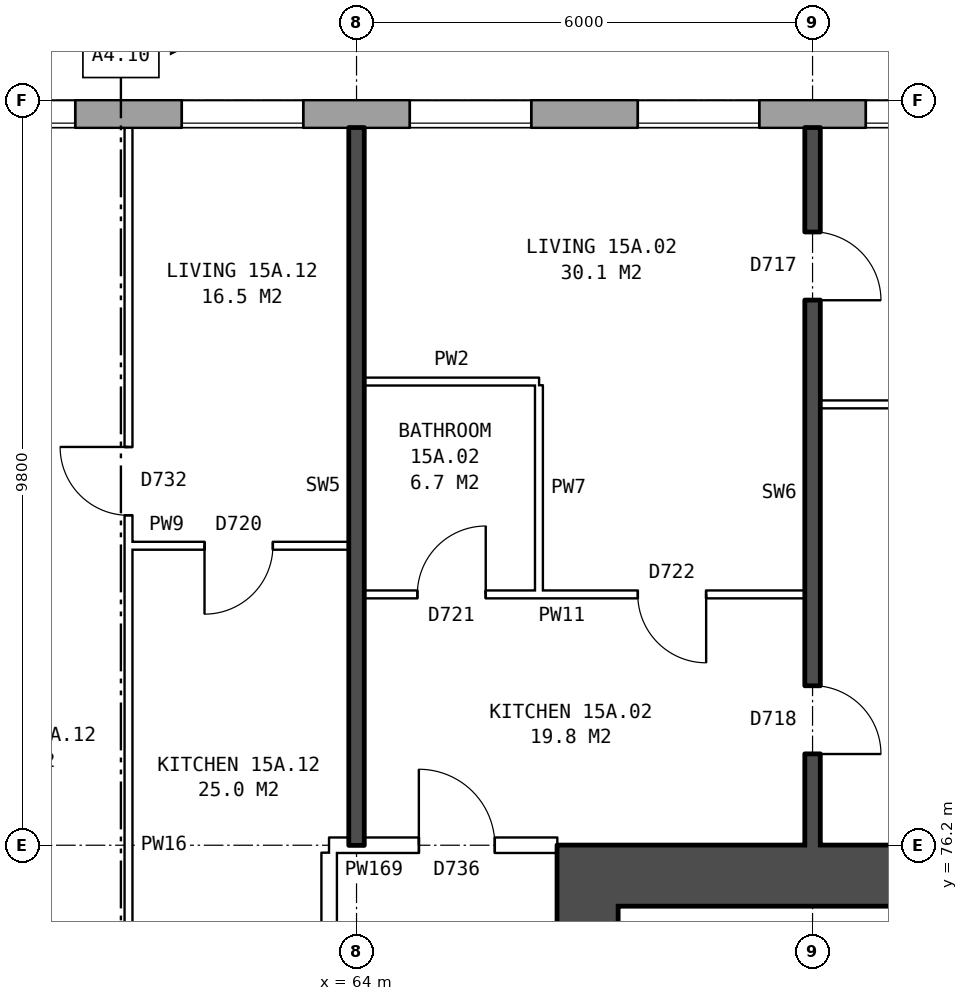
"""IFC4 building model, lengths in metres.
Left out: names, types, materials, properties, quantities, classifications, styles, units other than length and angle.
Written with IfcOpenShell. Run it as: python <this file> out.ifc"""

import sys

from ifc_helpers import new_model, si_unit, direction, frame, frame_2d, origin, place, context, subcontext, project, spatial, rectangle, extrude, element, fill, save


model = new_model("IFC4")
c1 = context("Model", 3, precision=1e-05, world=origin(), true_north=direction((0.0, 1.0)))
c2 = subcontext(c1, "Body", "Model", "MODEL_VIEW")
j1 = project(units=[si_unit("LENGTHUNIT", "METRE"), si_unit("PLANEANGLEUNIT", "RADIAN")], contexts=[c1])
p1 = place(None, origin())
s1 = spatial("IfcSite", under=j1, at=p1, CompositionType="ELEMENT")
p2 = place(p1, origin())
s2 = spatial("IfcBuilding", under=s1, at=p2, CompositionType="ELEMENT")
p3 = place(p2, frame((0.0, 0.0, 56.7)))
s3 = spatial("IfcBuildingStorey", under=s2, at=p3, CompositionType="ELEMENT", Elevation=56.7)
p4 = place(p3, frame((72.925, 85.82, 0.0), z_axis=(0.0, 0.0, 1.0), x_axis=(-1.0, 0.0, 0.0)))
e1 = element("IfcWall", 1, at=p4, inside=s3, PredefinedType="STANDARD", context=c2, shape_type="SweptSolid", body=[
    extrude(rectangle(XDim=48.351, YDim=0.36, at=frame_2d((24.175, 0.0))), origin(), (0.0, 0.0, 1.0), 2.85),
])
p5 = place(p4, frame((0.625, 0.0, 0.8)))
e2 = element("IfcOpeningElement", 2, at=p5, cuts=e1, PredefinedType="OPENING", context=c2, shape_type="SweptSolid", body=[
    extrude(rectangle(XDim=1.6, YDim=1.8, at=frame_2d((0.8, 0.9))), frame((0.0, 0.19, 0.0), z_axis=(0.0, -1.0, 0.0), x_axis=(1.0, 0.0, 0.0)), (0.0, 0.0, 1.0), 0.38),
])
p6 = place(p4, frame((3.625, 0.0, 0.8)))
e3 = element("IfcOpeningElement", 3, at=p6, cuts=e1, PredefinedType="OPENING", context=c2, shape_type="SweptSolid", body=[
    extrude(rectangle(XDim=1.6, YDim=1.8, at=frame_2d((0.8, 0.9))), frame((0.0, 0.19, 0.0), z_axis=(0.0, -1.0, 0.0), x_axis=(1.0, 0.0, 0.0)), (0.0, 0.0, 1.0), 0.38),
])
p7 = place(p4, frame((6.625, 0.0, 0.8)))
e4 = element("IfcOpeningElement", 4, at=p7, cuts=e1, PredefinedType="OPENING", context=c2, shape_type="SweptSolid", body=[
    extrude(rectangle(XDim=1.6, YDim=1.8, at=frame_2d((0.8, 0.9))), frame((0.0, 0.19, 0.0), z_axis=(0.0, -1.0, 0.0), x_axis=(1.0, 0.0, 0.0)), (0.0, 0.0, 1.0), 0.38),
])
p8 = place(p4, frame((9.625, 0.0, 0.8)))
e5 = element("IfcOpeningElement", 5, at=p8, cuts=e1, PredefinedType="OPENING", context=c2, shape_type="SweptSolid", body=[
    extrude(rectangle(XDim=1.6, YDim=1.8, at=frame_2d((0.8, 0.9))), frame((0.0, 0.19, 0.0), z_axis=(0.0, -1.0, 0.0), x_axis=(1.0, 0.0, 0.0)), (0.0, 0.0, 1.0), 0.38),
])
p9 = place(p4, frame((12.625, 0.0, 0.8)))
e6 = element("IfcOpeningElement", 6, at=p9, cuts=e1, PredefinedType="OPENING", context=c2, shape_type="SweptSolid", body=[
    extrude(rectangle(XDim=1.6, YDim=1.8, at=frame_2d((0.8, 0.9))), frame((0.0, 0.19, 0.0), z_axis=(0.0, -1.0, 0.0), x_axis=(1.0, 0.0, 0.0)), (0.0, 0.0, 1.0), 0.38),
])
p10 = place(p4, frame((15.125, 0.0, 0.8)))
e7 = element("IfcOpeningElement", 7, at=p10, cuts=e1, PredefinedType="OPENING", context=c2, shape_type="SweptSolid", body=[
    extrude(rectangle(XDim=1.0, YDim=1.8, at=frame_2d((0.5, 0.9))), frame((0.0, 0.19, 0.0), z_axis=(0.0, -1.0, 0.0), x_axis=(1.0, 0.0, 0.0)), (0.0, 0.0, 1.0), 0.38),
])
p11 = place(p4, frame((18.625, 0.0, 0.65)))
e8 = element("IfcOpeningElement", 8, at=p11, cuts=e1, PredefinedType="OPENING", context=c2, shape_type="SweptSolid", body=[
    extrude(rectangle(XDim=0.8, YDim=0.9, at=frame_2d((0.4, 0.45))), frame((0.0, 0.19, 0.0), z_axis=(0.0, -1.0, 0.0), x_axis=(1.0, 0.0, 0.0)), (0.0, 0.0, 1.0), 0.38),
])
p12 = place(p4, frame((21.625, 0.0, 0.8)))
e9 = element("IfcOpeningElement", 9, at=p12, cuts=e1, PredefinedType="OPENING", context=c2, shape_type="SweptSolid", body=[
    extrude(rectangle(XDim=1.6, YDim=1.8, at=frame_2d((0.8, 0.9))), frame((0.0, 0.19, 0.0), z_axis=(0.0, -1.0, 0.0), x_axis=(1.0, 0.0, 0.0)), (0.0, 0.0, 1.0), 0.38),
])
p13 = place(p4, frame((24.625, 0.0, 0.8)))
e10 = element("IfcOpeningElement", 10, at=p13, cuts=e1, PredefinedType="OPENING", context=c2, shape_type="SweptSolid", body=[
    extrude(rectangle(XDim=1.6, YDim=1.8, at=frame_2d((0.8, 0.9))), frame((0.0, 0.19, 0.0), z_axis=(0.0, -1.0, 0.0), x_axis=(1.0, 0.0, 0.0)), (0.0, 0.0, 1.0), 0.38),
])
p14 = place(p4, frame((27.125, 0.0, 0.8)))
e11 = element("IfcOpeningElement", 11, at=p14, cuts=e1, PredefinedType="OPENING", context=c2, shape_type="SweptSolid", body=[
    extrude(rectangle(XDim=1.0, YDim=1.8, at=frame_2d((0.5, 0.9))), frame((0.0, 0.19, 0.0), z_axis=(0.0, -1.0, 0.0), x_axis=(1.0, 0.0, 0.0)), (0.0, 0.0, 1.0), 0.38),
])
p15 = place(p4, frame((28.425, 0.0, 0.8)))
e12 = element("IfcOpeningElement", 12, at=p15, cuts=e1, PredefinedType="OPENING", context=c2, shape_type="SweptSolid", body=[
    extrude(rectangle(XDim=1.0, YDim=0.9, at=frame_2d((0.5, 0.45))), frame((0.0, 0.19, 0.0), z_axis=(0.0, -1.0, 0.0), x_axis=(1.0, 0.0, 0.0)), (0.0, 0.0, 1.0), 0.38),
])
p16 = place(p4, frame((33.625, 0.0, 0.8)))
e13 = element("IfcOpeningElement", 13, at=p16, cuts=e1, PredefinedType="OPENING", context=c2, shape_type="SweptSolid", body=[
    extrude(rectangle(XDim=1.6, YDim=1.8, at=frame_2d((0.8, 0.9))), frame((0.0, 0.19, 0.0), z_axis=(0.0, -1.0, 0.0), x_axis=(1.0, 0.0, 0.0)), (0.0, 0.0, 1.0), 0.38),
])
p17 = place(p4, frame((36.625, 0.0, 0.8)))
e14 = element("IfcOpeningElement", 14, at=p17, cuts=e1, PredefinedType="OPENING", context=c2, shape_type="SweptSolid", body=[
    extrude(rectangle(XDim=1.6, YDim=1.8, at=frame_2d((0.8, 0.9))), frame((0.0, 0.19, 0.0), z_axis=(0.0, -1.0, 0.0), x_axis=(1.0, 0.0, 0.0)), (0.0, 0.0, 1.0), 0.38),
])
p18 = place(p4, frame((39.625, 0.0, 0.8)))
e15 = element("IfcOpeningElement", 15, at=p18, cuts=e1, PredefinedType="OPENING", context=c2, shape_type="SweptSolid", body=[
    extrude(rectangle(XDim=1.6, YDim=1.8, at=frame_2d((0.8, 0.9))), frame((0.0, 0.19, 0.0), z_axis=(0.0, -1.0, 0.0), x_axis=(1.0, 0.0, 0.0)), (0.0, 0.0, 1.0), 0.38),
])
p19 = place(p4, frame((42.625, 0.0, 0.8)))
e16 = element("IfcOpeningElement", 16, at=p19, cuts=e1, PredefinedType="OPENING", context=c2, shape_type="SweptSolid", body=[
    extrude(rectangle(XDim=1.6, YDim=1.8, at=frame_2d((0.8, 0.9))), frame((0.0, 0.19, 0.0), z_axis=(0.0, -1.0, 0.0), x_axis=(1.0, 0.0, 0.0)), (0.0, 0.0, 1.0), 0.38),
])
p20 = place(p4, frame((45.625, 0.0, 0.8)))
e17 = element("IfcOpeningElement", 17, at=p20, cuts=e1, PredefinedType="OPENING", context=c2, shape_type="SweptSolid", body=[
    extrude(rectangle(XDim=1.6, YDim=1.8, at=frame_2d((0.8, 0.9))), frame((0.0, 0.19, 0.0), z_axis=(0.0, -1.0, 0.0), x_axis=(1.0, 0.0, 0.0)), (0.0, 0.0, 1.0), 0.38),
])
p21 = place(p4, frame((16.425, 0.0, 1.7)))
e18 = element("IfcOpeningElement", 18, at=p21, cuts=e1, PredefinedType="OPENING", context=c2, shape_type="SweptSolid", body=[
    extrude(rectangle(XDim=1.0, YDim=0.9, at=frame_2d((0.5, 0.45))), frame((0.0, 0.19, 0.0), z_axis=(0.0, -1.0, 0.0), x_axis=(1.0, 0.0, 0.0)), (0.0, 0.0, 1.0), 0.38),
])
p22 = place(p4, frame((19.725, 0.0, 0.75)))
e19 = element("IfcOpeningElement", 19, at=p22, cuts=e1, PredefinedType="OPENING", context=c2, shape_type="SweptSolid", body=[
    extrude(rectangle(XDim=1.0, YDim=1.5, at=frame_2d((0.5, 0.75))), frame((0.0, 0.19, 0.0), z_axis=(0.0, -1.0, 0.0), x_axis=(1.0, 0.0, 0.0)), (0.0, 0.0, 1.0), 0.38),
])
p23 = place(p4, frame((30.875, 0.0, 1.7)))
e20 = element("IfcOpeningElement", 20, at=p23, cuts=e1, PredefinedType="OPENING", context=c2, shape_type="SweptSolid", body=[
    extrude(rectangle(XDim=0.6, YDim=0.9, at=frame_2d((0.3, 0.45))), frame((0.0, 0.19, 0.0), z_axis=(0.0, -1.0, 0.0), x_axis=(1.0, 0.0, 0.0)), (0.0, 0.0, 1.0), 0.38),
])
p24 = place(p4, frame((31.775, 0.0, 1.1)))
e21 = element("IfcOpeningElement", 21, at=p24, cuts=e1, PredefinedType="OPENING", context=c2, shape_type="SweptSolid", body=[
    extrude(rectangle(XDim=0.8, YDim=1.5, at=frame_2d((0.4, 0.75))), frame((0.0, 0.19, 0.0), z_axis=(0.0, -1.0, 0.0), x_axis=(1.0, 0.0, 0.0)), (0.0, 0.0, 1.0), 0.38),
])
p25 = place(p3, frame((67.04, 64.6, 0.0), z_axis=(0.0, 0.0, 1.0), x_axis=(0.0, 1.0, 0.0)))
e22 = element("IfcWall", 22, at=p25, inside=s3, PredefinedType="SHEAR", context=c2, shape_type="SweptSolid", body=[
    extrude(rectangle(XDim=10.8, YDim=0.8, at=frame_2d((5.4, 0.0))), origin(), (0.0, 0.0, 1.0), 2.85),
])
p26 = place(p25, frame((0.525, 0.0, 0.0)))
e23 = element("IfcOpeningElement", 23, at=p26, cuts=e22, PredefinedType="OPENING", context=c2, shape_type="SweptSolid", body=[
    extrude(rectangle(XDim=1.1, YDim=2.1, at=frame_2d((0.55, 1.05))), frame((0.0, 0.41, 0.0), z_axis=(0.0, -1.0, 0.0), x_axis=(1.0, 0.0, 0.0)), (0.0, 0.0, 1.0), 0.82),
])
p27 = place(p25, frame((9.1, 0.0, 0.0)))
e24 = element("IfcOpeningElement", 24, at=p27, cuts=e22, PredefinedType="OPENING", context=c2, shape_type="SweptSolid", body=[
    extrude(rectangle(XDim=1.1, YDim=2.1, at=frame_2d((0.55, 1.05))), frame((0.0, 0.41, 0.0), z_axis=(0.0, -1.0, 0.0), x_axis=(1.0, 0.0, 0.0)), (0.0, 0.0, 1.0), 0.82),
])
p28 = place(p3, frame((66.64, 75.8, 0.0), z_axis=(0.0, 0.0, 1.0), x_axis=(1.0, 0.0, 0.0)))
e25 = element("IfcWall", 25, at=p28, inside=s3, PredefinedType="SHEAR", context=c2, shape_type="SweptSolid", body=[
    extrude(rectangle(XDim=9.0, YDim=0.8, at=frame_2d((4.5, 0.0))), origin(), (0.0, 0.0, 1.0), 2.85),
])
p29 = place(p3, frame((63.64, 63.9, 0.0), z_axis=(0.0, 0.0, 1.0), x_axis=(0.0, 1.0, 0.0)))
e26 = element("IfcWall", 26, at=p29, inside=s3, PredefinedType="PARTITIONING", context=c2, shape_type="SweptSolid", body=[
    extrude(rectangle(XDim=12.2, YDim=0.2, at=frame_2d((6.1, 0.0))), origin(), (0.0, 0.0, 1.0), 2.85),
])
p30 = place(p29, frame((5.1, 0.0, 0.0)))
e27 = element("IfcOpeningElement", 27, at=p30, cuts=e26, PredefinedType="OPENING", context=c2, shape_type="SweptSolid", body=[
    extrude(rectangle(XDim=2.0, YDim=2.1, at=frame_2d((1.0, 1.05))), frame((0.0, 0.11, 0.0), z_axis=(0.0, -1.0, 0.0), x_axis=(1.0, 0.0, 0.0)), (0.0, 0.0, 1.0), 0.22),
])
p31 = place(p3, frame((63.64, 76.2, 0.0), z_axis=(0.0, 0.0, 1.0), x_axis=(1.0, 0.0, 0.0)))
e28 = element("IfcWall", 28, at=p31, inside=s3, PredefinedType="PARTITIONING", context=c2, shape_type="SweptSolid", body=[
    extrude(rectangle(XDim=3.0, YDim=0.2, at=frame_2d((1.5, 0.0))), origin(), (0.0, 0.0, 1.0), 2.85),
])
p32 = place(p31, frame((1.18, 0.0, 0.0)))
e29 = element("IfcOpeningElement", 29, at=p32, cuts=e28, PredefinedType="OPENING", context=c2, shape_type="SweptSolid", body=[
    extrude(rectangle(XDim=1.0, YDim=2.1, at=frame_2d((0.5, 1.05))), frame((0.0, 0.11, 0.0), z_axis=(0.0, -1.0, 0.0), x_axis=(1.0, 0.0, 0.0)), (0.0, 0.0, 1.0), 0.22),
])
p33 = place(p3, frame((64.1, 79.5, 0.0), z_axis=(0.0, 0.0, 1.0), x_axis=(1.0, 0.0, 0.0)))
e30 = element("IfcWall", 30, at=p33, inside=s3, PredefinedType="PARTITIONING", context=c2, shape_type="SweptSolid", body=[
    extrude(rectangle(XDim=5.8, YDim=0.1, at=frame_2d((2.9, 0.0))), origin(), (0.0, 0.0, 1.0), 2.85),
])
p34 = place(p33, frame((3.6, 0.0, 0.0)))
e31 = element("IfcOpeningElement", 31, at=p34, cuts=e30, PredefinedType="OPENING", context=c2, shape_type="SweptSolid", body=[
    extrude(rectangle(XDim=0.9, YDim=2.1, at=frame_2d((0.45, 1.05))), frame((0.0, 0.06, 0.0), z_axis=(0.0, -1.0, 0.0), x_axis=(1.0, 0.0, 0.0)), (0.0, 0.0, 1.0), 0.12),
])
p35 = place(p33, frame((0.7, 0.0, 0.0)))
e32 = element("IfcOpeningElement", 32, at=p35, cuts=e30, PredefinedType="OPENING", context=c2, shape_type="SweptSolid", body=[
    extrude(rectangle(XDim=0.9, YDim=2.1, at=frame_2d((0.45, 1.05))), frame((0.0, 0.06, 0.0), z_axis=(0.0, -1.0, 0.0), x_axis=(1.0, 0.0, 0.0)), (0.0, 0.0, 1.0), 0.12),
])
p36 = place(p3, frame((61.0, 80.14, 0.0), z_axis=(0.0, 0.0, 1.0), x_axis=(1.0, 0.0, 0.0)))
e33 = element("IfcWall", 33, at=p36, inside=s3, PredefinedType="PARTITIONING", context=c2, shape_type="SweptSolid", body=[
    extrude(rectangle(XDim=2.9, YDim=0.1, at=frame_2d((1.45, 0.0))), origin(), (0.0, 0.0, 1.0), 2.85),
])
p37 = place(p36, frame((1.0, 0.0, 0.0)))
e34 = element("IfcOpeningElement", 34, at=p37, cuts=e33, PredefinedType="OPENING", context=c2, shape_type="SweptSolid", body=[
    extrude(rectangle(XDim=0.9, YDim=2.1, at=frame_2d((0.45, 1.05))), frame((0.0, 0.06, 0.0), z_axis=(0.0, -1.0, 0.0), x_axis=(1.0, 0.0, 0.0)), (0.0, 0.0, 1.0), 0.12),
])
p38 = place(p3, frame((70.1, 82.0, 0.0), z_axis=(0.0, 0.0, 1.0), x_axis=(1.0, 0.0, 0.0)))
e35 = element("IfcWall", 35, at=p38, inside=s3, PredefinedType="PARTITIONING", context=c2, shape_type="SweptSolid", body=[
    extrude(rectangle(XDim=5.54, YDim=0.1, at=frame_2d((2.77, 0.0))), origin(), (0.0, 0.0, 1.0), 2.85),
])
p39 = place(p3, frame((64.1, 82.3, 0.0), z_axis=(0.0, 0.0, 1.0), x_axis=(1.0, 0.0, 0.0)))
e36 = element("IfcWall", 36, at=p39, inside=s3, PredefinedType="PARTITIONING", context=c2, shape_type="SweptSolid", body=[
    extrude(rectangle(XDim=2.3, YDim=0.1, at=frame_2d((1.15, 0.0))), origin(), (0.0, 0.0, 1.0), 2.85),
])
p40 = place(p3, frame((61.0, 71.3, 0.0), z_axis=(0.0, 0.0, 1.0), x_axis=(0.0, 1.0, 0.0)))
e37 = element("IfcWall", 37, at=p40, inside=s3, PredefinedType="PARTITIONING", context=c2, shape_type="SweptSolid", body=[
    extrude(rectangle(XDim=14.34, YDim=0.1, at=frame_2d((7.17, 0.0))), origin(), (0.0, 0.0, 1.0), 2.85),
])
p41 = place(p40, frame((9.24, 0.0, 0.0)))
e38 = element("IfcOpeningElement", 38, at=p41, cuts=e37, PredefinedType="OPENING", context=c2, shape_type="SweptSolid", body=[
    extrude(rectangle(XDim=0.9, YDim=2.1, at=frame_2d((0.45, 1.05))), frame((0.0, 0.06, 0.0), z_axis=(0.0, -1.0, 0.0), x_axis=(1.0, 0.0, 0.0)), (0.0, 0.0, 1.0), 0.12),
])
p42 = place(p40, frame((0.9, 0.0, 0.0)))
e39 = element("IfcOpeningElement", 39, at=p42, cuts=e37, PredefinedType="OPENING", context=c2, shape_type="SweptSolid", body=[
    extrude(rectangle(XDim=0.9, YDim=2.1, at=frame_2d((0.45, 1.05))), frame((0.0, 0.06, 0.0), z_axis=(0.0, -1.0, 0.0), x_axis=(1.0, 0.0, 0.0)), (0.0, 0.0, 1.0), 0.12),
])
p43 = place(p3, frame((64.0, 76.2, 0.0), z_axis=(0.0, 0.0, 1.0), x_axis=(0.0, 1.0, 0.0)))
e40 = element("IfcWall", 40, at=p43, inside=s3, PredefinedType="SOLIDWALL", context=c2, shape_type="SweptSolid", body=[
    extrude(rectangle(XDim=9.44, YDim=0.2, at=frame_2d((4.72, 0.0))), origin(), (0.0, 0.0, 1.0), 2.85),
])
p44 = place(p3, frame((66.4, 79.55, 0.0), z_axis=(0.0, 0.0, 1.0), x_axis=(0.0, 1.0, 0.0)))
e41 = element("IfcWall", 41, at=p44, inside=s3, PredefinedType="PARTITIONING", context=c2, shape_type="SweptSolid", body=[
    extrude(rectangle(XDim=2.7, YDim=0.1, at=frame_2d((1.35, 0.0))), origin(), (0.0, 0.0, 1.0), 2.85),
])
p45 = place(p3, frame((70.0, 76.2, 0.0), z_axis=(0.0, 0.0, 1.0), x_axis=(0.0, 1.0, 0.0)))
e42 = element("IfcWall", 42, at=p45, inside=s3, PredefinedType="SOLIDWALL", context=c2, shape_type="SweptSolid", body=[
    extrude(rectangle(XDim=9.44, YDim=0.2, at=frame_2d((4.72, 0.0))), origin(), (0.0, 0.0, 1.0), 2.85),
])
p46 = place(p45, frame((7.17, 0.0, 0.0)))
e43 = element("IfcOpeningElement", 43, at=p46, cuts=e42, PredefinedType="OPENING", context=c2, shape_type="SweptSolid", body=[
    extrude(rectangle(XDim=0.9, YDim=2.1, at=frame_2d((0.45, 1.05))), frame((0.0, 0.11, 0.0), z_axis=(0.0, -1.0, 0.0), x_axis=(1.0, 0.0, 0.0)), (0.0, 0.0, 1.0), 0.22),
])
p47 = place(p45, frame((1.2, 0.0, 0.0)))
e44 = element("IfcOpeningElement", 44, at=p47, cuts=e42, PredefinedType="OPENING", context=c2, shape_type="SweptSolid", body=[
    extrude(rectangle(XDim=0.9, YDim=2.1, at=frame_2d((0.45, 1.05))), frame((0.0, 0.11, 0.0), z_axis=(0.0, -1.0, 0.0), x_axis=(1.0, 0.0, 0.0)), (0.0, 0.0, 1.0), 0.22),
])
p48 = place(p5, origin())
e45 = element("IfcWindow", 45, at=p48, inside=s3, PartitioningType="SINGLE_PANEL", PredefinedType="WINDOW", context=c2, shape_type="SweptSolid", body=[
    extrude(rectangle(XDim=1.6, YDim=1.8, at=frame_2d((0.8, 0.9))), frame((0.0, 0.15, 0.0), z_axis=(0.0, -1.0, 0.0), x_axis=(1.0, 0.0, 0.0)), (0.0, 0.0, 1.0), 0.06),
])
fill(e2, e45)
p49 = place(p6, origin())
e46 = element("IfcWindow", 46, at=p49, inside=s3, PartitioningType="SINGLE_PANEL", PredefinedType="WINDOW", context=c2, shape_type="SweptSolid", body=[
    extrude(rectangle(XDim=1.6, YDim=1.8, at=frame_2d((0.8, 0.9))), frame((0.0, 0.15, 0.0), z_axis=(0.0, -1.0, 0.0), x_axis=(1.0, 0.0, 0.0)), (0.0, 0.0, 1.0), 0.06),
])
fill(e3, e46)
p50 = place(p7, origin())
e47 = element("IfcWindow", 47, at=p50, inside=s3, PartitioningType="SINGLE_PANEL", PredefinedType="WINDOW", context=c2, shape_type="SweptSolid", body=[
    extrude(rectangle(XDim=1.6, YDim=1.8, at=frame_2d((0.8, 0.9))), frame((0.0, 0.15, 0.0), z_axis=(0.0, -1.0, 0.0), x_axis=(1.0, 0.0, 0.0)), (0.0, 0.0, 1.0), 0.06),
])
fill(e4, e47)
p51 = place(p8, origin())
e48 = element("IfcWindow", 48, at=p51, inside=s3, PartitioningType="SINGLE_PANEL", PredefinedType="WINDOW", context=c2, shape_type="SweptSolid", body=[
    extrude(rectangle(XDim=1.6, YDim=1.8, at=frame_2d((0.8, 0.9))), frame((0.0, 0.15, 0.0), z_axis=(0.0, -1.0, 0.0), x_axis=(1.0, 0.0, 0.0)), (0.0, 0.0, 1.0), 0.06),
])
fill(e5, e48)
p52 = place(p9, origin())
e49 = element("IfcWindow", 49, at=p52, inside=s3, PartitioningType="SINGLE_PANEL", PredefinedType="WINDOW", context=c2, shape_type="SweptSolid", body=[
    extrude(rectangle(XDim=1.6, YDim=1.8, at=frame_2d((0.8, 0.9))), frame((0.0, 0.15, 0.0), z_axis=(0.0, -1.0, 0.0), x_axis=(1.0, 0.0, 0.0)), (0.0, 0.0, 1.0), 0.06),
])
fill(e6, e49)
p53 = place(p46, frame((0.9, 0.0, 0.0), z_axis=(0.0, 0.0, 1.0), x_axis=(-1.0, 0.0, 0.0)))
e50 = element("IfcDoor", 50, at=p53, inside=s3, OperationType="SINGLE_SWING_RIGHT", PredefinedType="DOOR", context=c2, shape_type="SweptSolid", body=[
    extrude(rectangle(XDim=0.9, YDim=2.1, at=frame_2d((0.45, 1.05))), frame((0.0, 0.025, 0.0), z_axis=(0.0, -1.0, 0.0), x_axis=(1.0, 0.0, 0.0)), (0.0, 0.0, 1.0), 0.05),
])
fill(e43, e50)
p54 = place(p47, frame((0.9, 0.0, 0.0), z_axis=(0.0, 0.0, 1.0), x_axis=(-1.0, 0.0, 0.0)))
e51 = element("IfcDoor", 51, at=p54, inside=s3, OperationType="SINGLE_SWING_RIGHT", PredefinedType="DOOR", context=c2, shape_type="SweptSolid", body=[
    extrude(rectangle(XDim=0.9, YDim=2.1, at=frame_2d((0.45, 1.05))), frame((0.0, 0.025, 0.0), z_axis=(0.0, -1.0, 0.0), x_axis=(1.0, 0.0, 0.0)), (0.0, 0.0, 1.0), 0.05),
])
fill(e44, e51)
p55 = place(p32, origin())
e52 = element("IfcDoor", 52, at=p55, inside=s3, OperationType="SINGLE_SWING_LEFT", PredefinedType="DOOR", context=c2, shape_type="SweptSolid", body=[
    extrude(rectangle(XDim=1.0, YDim=2.1, at=frame_2d((0.5, 1.05))), frame((0.0, 0.025, 0.0), z_axis=(0.0, -1.0, 0.0), x_axis=(1.0, 0.0, 0.0)), (0.0, 0.0, 1.0), 0.05),
])
fill(e29, e52)
p56 = place(p34, frame((0.9, 0.0, 0.0), z_axis=(0.0, 0.0, 1.0), x_axis=(-1.0, 0.0, 0.0)))
e53 = element("IfcDoor", 53, at=p56, inside=s3, OperationType="SINGLE_SWING_LEFT", PredefinedType="DOOR", context=c2, shape_type="SweptSolid", body=[
    extrude(rectangle(XDim=0.9, YDim=2.1, at=frame_2d((0.45, 1.05))), frame((0.0, 0.025, 0.0), z_axis=(0.0, -1.0, 0.0), x_axis=(1.0, 0.0, 0.0)), (0.0, 0.0, 1.0), 0.05),
])
fill(e31, e53)
p57 = place(p35, origin())
e54 = element("IfcDoor", 54, at=p57, inside=s3, OperationType="SINGLE_SWING_RIGHT", PredefinedType="DOOR", context=c2, shape_type="SweptSolid", body=[
    extrude(rectangle(XDim=0.9, YDim=2.1, at=frame_2d((0.45, 1.05))), frame((0.0, 0.025, 0.0), z_axis=(0.0, -1.0, 0.0), x_axis=(1.0, 0.0, 0.0)), (0.0, 0.0, 1.0), 0.05),
])
fill(e32, e54)
p58 = place(p41, origin())
e55 = element("IfcDoor", 55, at=p58, inside=s3, OperationType="SINGLE_SWING_RIGHT", PredefinedType="DOOR", context=c2, shape_type="SweptSolid", body=[
    extrude(rectangle(XDim=0.9, YDim=2.1, at=frame_2d((0.45, 1.05))), frame((0.0, 0.025, 0.0), z_axis=(0.0, -1.0, 0.0), x_axis=(1.0, 0.0, 0.0)), (0.0, 0.0, 1.0), 0.05),
])
fill(e38, e55)
p59 = place(p37, frame((0.9, 0.0, 0.0), z_axis=(0.0, 0.0, 1.0), x_axis=(-1.0, 0.0, 0.0)))
e56 = element("IfcDoor", 56, at=p59, inside=s3, OperationType="SINGLE_SWING_RIGHT", PredefinedType="DOOR", context=c2, shape_type="SweptSolid", body=[
    extrude(rectangle(XDim=0.9, YDim=2.1, at=frame_2d((0.45, 1.05))), frame((0.0, 0.025, 0.0), z_axis=(0.0, -1.0, 0.0), x_axis=(1.0, 0.0, 0.0)), (0.0, 0.0, 1.0), 0.05),
])
fill(e34, e56)
save(model, sys.argv[1])
